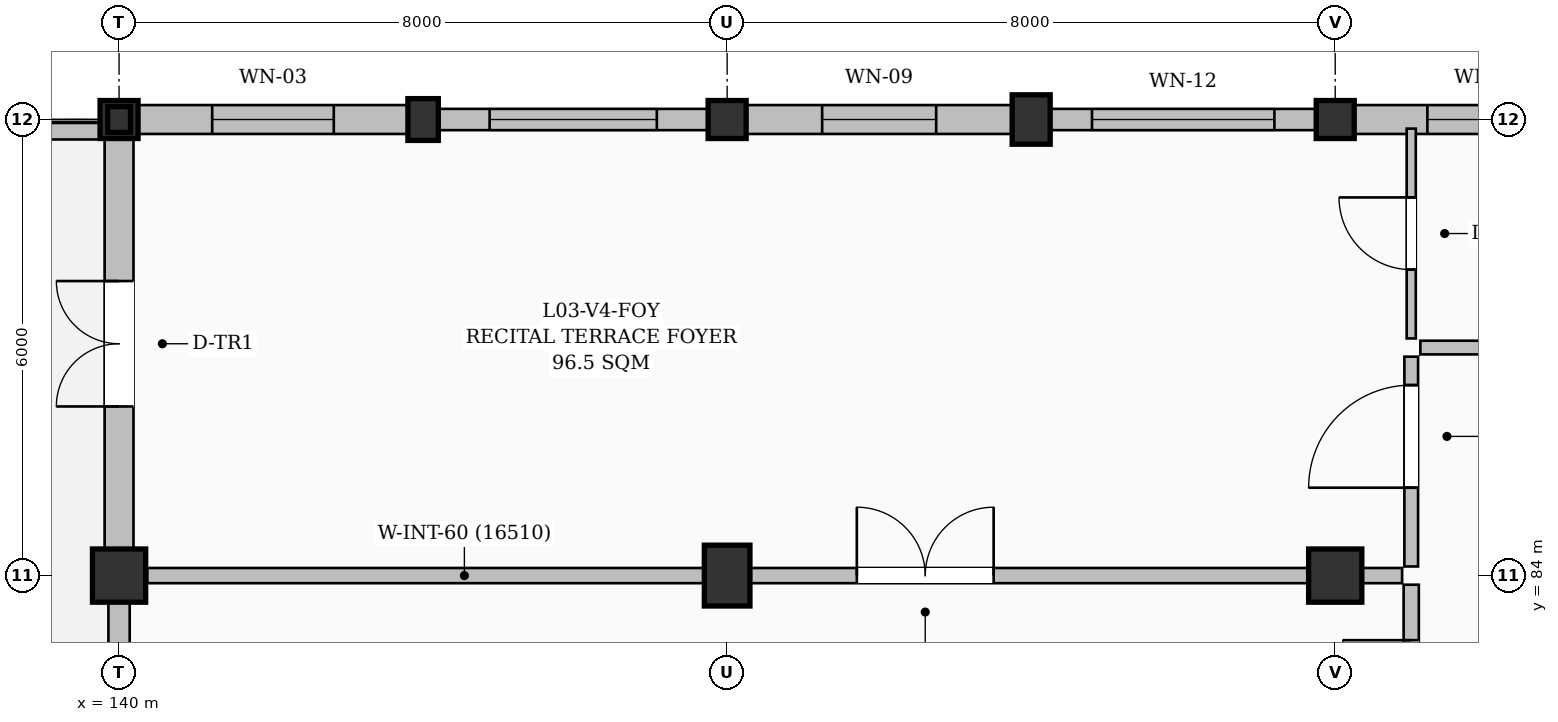
"""IFC4 building model, lengths in metres.
Left out: names, types, materials, properties, quantities, classifications, styles, units other than length and angle.
Written with IfcOpenShell. Run it as: python <this file> out.ifc"""

import sys

from ifc_helpers import new_model, si_unit, direction, frame, frame_2d, origin, origin_2d, place, context, subcontext, project, spatial, rectangle, i_section, extrude, element, fill, save


model = new_model("IFC4")
c1 = context("Model", 3, precision=1e-05, world=origin(), true_north=direction((0.0, 1.0)))
c2 = subcontext(c1, "Body", "Model", "MODEL_VIEW")
j1 = project(units=[si_unit("LENGTHUNIT", "METRE"), si_unit("PLANEANGLEUNIT", "RADIAN")], contexts=[c1])
p1 = place(None, origin())
s1 = spatial("IfcSite", under=j1, at=p1, CompositionType="ELEMENT")
p2 = place(p1, origin())
s2 = spatial("IfcBuilding", under=s1, at=p2, CompositionType="ELEMENT")
p3 = place(p2, frame((0.0, 0.0, 13.8)))
s3 = spatial("IfcBuildingStorey", under=s2, at=p3, CompositionType="ELEMENT", Elevation=13.8)
p4 = place(p3, frame((140.0, 84.0, 0.0), z_axis=(0.0, 0.0, 1.0), x_axis=(1.0, 0.0, 0.0)))
e1 = element("IfcColumn", 1, at=p4, inside=s3, PredefinedType="COLUMN", context=c2, shape_type="SweptSolid", body=[
    extrude(rectangle(XDim=0.7, YDim=0.7, at=origin_2d()), origin(), (0.0, 0.0, 1.0), 4.5),
])
p5 = place(p3, frame((140.0, 90.0, 0.0), z_axis=(0.0, 0.0, 1.0), x_axis=(1.0, 0.0, 0.0)))
e2 = element("IfcColumn", 2, at=p5, inside=s3, PredefinedType="COLUMN", context=c2, shape_type="SweptSolid", body=[
    extrude(rectangle(XDim=0.5, YDim=0.5, at=origin_2d()), origin(), (0.0, 0.0, 1.0), 4.5),
])
p6 = place(p3, frame((144.0, 90.0, 0.0), z_axis=(0.0, 0.0, 1.0), x_axis=(1.0, 0.0, 0.0)))
e3 = element("IfcColumn", 3, at=p6, inside=s3, PredefinedType="PILASTER", context=c2, shape_type="SweptSolid", body=[
    extrude(rectangle(XDim=0.4, YDim=0.55, at=origin_2d()), origin(), (0.0, 0.0, 1.0), 4.5),
])
p7 = place(p3, frame((148.0, 84.0, 0.0), z_axis=(0.0, 0.0, 1.0), x_axis=(1.0, 0.0, 0.0)))
e4 = element("IfcColumn", 4, at=p7, inside=s3, PredefinedType="COLUMN", context=c2, shape_type="SweptSolid", body=[
    extrude(rectangle(XDim=0.6, YDim=0.8, at=origin_2d()), origin(), (0.0, 0.0, 1.0), 4.5),
])
p8 = place(p3, frame((148.0, 90.0, 0.0), z_axis=(0.0, 0.0, 1.0), x_axis=(1.0, 0.0, 0.0)))
e5 = element("IfcColumn", 5, at=p8, inside=s3, PredefinedType="COLUMN", context=c2, shape_type="SweptSolid", body=[
    extrude(rectangle(XDim=0.5, YDim=0.5, at=origin_2d()), origin(), (0.0, 0.0, 1.0), 4.5),
])
p9 = place(p3, frame((152.0, 90.0, 0.0), z_axis=(0.0, 0.0, 1.0), x_axis=(1.0, 0.0, 0.0)))
e6 = element("IfcColumn", 6, at=p9, inside=s3, PredefinedType="PILASTER", context=c2, shape_type="SweptSolid", body=[
    extrude(rectangle(XDim=0.5, YDim=0.65, at=origin_2d()), origin(), (0.0, 0.0, 1.0), 4.5),
])
p10 = place(p3, frame((156.0, 84.0, 0.0), z_axis=(0.0, 0.0, 1.0), x_axis=(1.0, 0.0, 0.0)))
e7 = element("IfcColumn", 7, at=p10, inside=s3, PredefinedType="COLUMN", context=c2, shape_type="SweptSolid", body=[
    extrude(rectangle(XDim=0.7, YDim=0.7, at=origin_2d()), origin(), (0.0, 0.0, 1.0), 4.5),
])
p11 = place(p3, frame((156.0, 90.0, 0.0), z_axis=(0.0, 0.0, 1.0), x_axis=(1.0, 0.0, 0.0)))
e8 = element("IfcColumn", 8, at=p11, inside=s3, PredefinedType="COLUMN", context=c2, shape_type="SweptSolid", body=[
    extrude(rectangle(XDim=0.5, YDim=0.5, at=origin_2d()), origin(), (0.0, 0.0, 1.0), 4.5),
])
p12 = place(p3, frame((140.0, 90.0, 4.5), z_axis=(0.0, 0.0, 1.0), x_axis=(1.0, 0.0, 0.0)))
e9 = element("IfcColumn", 9, at=p12, inside=s3, PredefinedType="COLUMN", context=c2, shape_type="SweptSolid", body=[
    extrude(i_section(OverallWidth=0.3, OverallDepth=0.34, WebThickness=0.012, FlangeThickness=0.021, FilletRadius=0.027, at=origin_2d()), origin(), (0.0, 0.0, 1.0), 1.454),
])
p13 = place(p3, frame((140.0, 76.35, 0.0), z_axis=(0.0, 0.0, 1.0), x_axis=(0.0, 1.0, 0.0)))
e10 = element("IfcWall", 10, at=p13, inside=s3, PredefinedType="SOLIDWALL", context=c2, shape_type="SweptSolid", body=[
    extrude(rectangle(XDim=7.3, YDim=0.28, at=frame_2d((3.65, 0.0))), origin(), (0.0, 0.0, 1.0), 3.585),
])
p14 = place(p13, frame((2.55, 0.0, 0.95)))
e11 = element("IfcOpeningElement", 11, at=p14, cuts=e10, PredefinedType="OPENING", context=c2, shape_type="SweptSolid", body=[
    extrude(rectangle(XDim=2.2, YDim=1.8, at=frame_2d((1.1, 0.9))), frame((0.0, 0.15, 0.0), z_axis=(0.0, -1.0, 0.0), x_axis=(1.0, 0.0, 0.0)), (0.0, 0.0, 1.0), 0.3),
])
p15 = place(p3, frame((140.0, 84.35, 0.0), z_axis=(0.0, 0.0, 1.0), x_axis=(0.0, 1.0, 0.0)))
e12 = element("IfcWall", 12, at=p15, inside=s3, PredefinedType="SOLIDWALL", context=c2, shape_type="SweptSolid", body=[
    extrude(rectangle(XDim=5.4, YDim=0.38, at=frame_2d((2.7, 0.0))), origin(), (0.0, 0.0, 1.0), 3.585),
])
p16 = place(p15, frame((1.875, 0.0, 0.0)))
e13 = element("IfcOpeningElement", 13, at=p16, cuts=e12, PredefinedType="OPENING", context=c2, shape_type="SweptSolid", body=[
    extrude(rectangle(XDim=1.65, YDim=2.25, at=frame_2d((0.825, 1.125))), frame((0.0, 0.2, 0.0), z_axis=(0.0, -1.0, 0.0), x_axis=(1.0, 0.0, 0.0)), (0.0, 0.0, 1.0), 0.4),
])
p17 = place(p3, frame((140.25, 90.0, 0.0), z_axis=(0.0, 0.0, 1.0), x_axis=(1.0, 0.0, 0.0)))
e14 = element("IfcWall", 14, at=p17, inside=s3, PredefinedType="SOLIDWALL", context=c2, shape_type="SweptSolid", body=[
    extrude(rectangle(XDim=3.55, YDim=0.38, at=frame_2d((1.775, 0.0))), origin(), (0.0, 0.0, 1.0), 4.125),
])
p18 = place(p17, frame((0.975, 0.0, 0.95)))
e15 = element("IfcOpeningElement", 15, at=p18, cuts=e14, PredefinedType="OPENING", context=c2, shape_type="SweptSolid", body=[
    extrude(rectangle(XDim=1.6, YDim=1.8, at=frame_2d((0.8, 0.9))), frame((0.0, 0.2, 0.0), z_axis=(0.0, -1.0, 0.0), x_axis=(1.0, 0.0, 0.0)), (0.0, 0.0, 1.0), 0.4),
])
p19 = place(p3, frame((144.2, 90.0, 0.0), z_axis=(0.0, 0.0, 1.0), x_axis=(1.0, 0.0, 0.0)))
e16 = element("IfcWall", 16, at=p19, inside=s3, PredefinedType="SOLIDWALL", context=c2, shape_type="SweptSolid", body=[
    extrude(rectangle(XDim=3.55, YDim=0.28, at=frame_2d((1.775, 0.0))), origin(), (0.0, 0.0, 1.0), 4.125),
])
p20 = place(p19, frame((0.675, 0.0, 0.95)))
e17 = element("IfcOpeningElement", 17, at=p20, cuts=e16, PredefinedType="OPENING", context=c2, shape_type="SweptSolid", body=[
    extrude(rectangle(XDim=2.2, YDim=1.8, at=frame_2d((1.1, 0.9))), frame((0.0, 0.15, 0.0), z_axis=(0.0, -1.0, 0.0), x_axis=(1.0, 0.0, 0.0)), (0.0, 0.0, 1.0), 0.3),
])
p21 = place(p3, frame((148.25, 90.0, 0.0), z_axis=(0.0, 0.0, 1.0), x_axis=(1.0, 0.0, 0.0)))
e18 = element("IfcWall", 18, at=p21, inside=s3, PredefinedType="SOLIDWALL", context=c2, shape_type="SweptSolid", body=[
    extrude(rectangle(XDim=3.5, YDim=0.38, at=frame_2d((1.75, 0.0))), origin(), (0.0, 0.0, 1.0), 4.125),
])
p22 = place(p21, frame((1.0, 0.0, 0.95)))
e19 = element("IfcOpeningElement", 19, at=p22, cuts=e18, PredefinedType="OPENING", context=c2, shape_type="SweptSolid", body=[
    extrude(rectangle(XDim=1.5, YDim=1.5, at=frame_2d((0.75, 0.75))), frame((0.0, 0.2, 0.0), z_axis=(0.0, -1.0, 0.0), x_axis=(1.0, 0.0, 0.0)), (0.0, 0.0, 1.0), 0.4),
])
p23 = place(p3, frame((152.25, 90.0, 0.0), z_axis=(0.0, 0.0, 1.0), x_axis=(1.0, 0.0, 0.0)))
e20 = element("IfcWall", 20, at=p23, inside=s3, PredefinedType="SOLIDWALL", context=c2, shape_type="SweptSolid", body=[
    extrude(rectangle(XDim=3.5, YDim=0.28, at=frame_2d((1.75, 0.0))), origin(), (0.0, 0.0, 1.0), 4.125),
])
p24 = place(p23, frame((0.55, 0.0, 0.95)))
e21 = element("IfcOpeningElement", 21, at=p24, cuts=e20, PredefinedType="OPENING", context=c2, shape_type="SweptSolid", body=[
    extrude(rectangle(XDim=2.4, YDim=1.5, at=frame_2d((1.2, 0.75))), frame((0.0, 0.15, 0.0), z_axis=(0.0, -1.0, 0.0), x_axis=(1.0, 0.0, 0.0)), (0.0, 0.0, 1.0), 0.3),
])
p25 = place(p3, frame((156.25, 90.0, 0.0), z_axis=(0.0, 0.0, 1.0), x_axis=(1.0, 0.0, 0.0)))
e22 = element("IfcWall", 22, at=p25, inside=s3, PredefinedType="SOLIDWALL", context=c2, shape_type="SweptSolid", body=[
    extrude(rectangle(XDim=3.525, YDim=0.38, at=frame_2d((1.762, 0.0))), origin(), (0.0, 0.0, 1.0), 4.125),
])
p26 = place(p25, frame((0.962, 0.0, 0.95)))
e23 = element("IfcOpeningElement", 23, at=p26, cuts=e22, PredefinedType="OPENING", context=c2, shape_type="SweptSolid", body=[
    extrude(rectangle(XDim=1.6, YDim=1.2, at=frame_2d((0.8, 0.6))), frame((0.0, 0.2, 0.0), z_axis=(0.0, -1.0, 0.0), x_axis=(1.0, 0.0, 0.0)), (0.0, 0.0, 1.0), 0.4),
])
p27 = place(p3, frame((132.15, 89.85, 0.0), z_axis=(0.0, 0.0, 1.0), x_axis=(1.0, 0.0, 0.0)))
e24 = element("IfcWall", 24, at=p27, inside=s3, PredefinedType="PARAPET", context=c2, shape_type="SweptSolid", body=[
    extrude(rectangle(XDim=7.7, YDim=0.225, at=frame_2d((3.85, 0.0))), origin(), (0.0, 0.0, 1.0), 0.45),
])
p28 = place(p3, frame((140.37, 84.0, 0.0), z_axis=(0.0, 0.0, 1.0), x_axis=(1.0, 0.0, 0.0)))
e25 = element("IfcWall", 25, at=p28, inside=s3, PredefinedType="PARTITIONING", context=c2, shape_type="SweptSolid", body=[
    extrude(rectangle(XDim=16.51, YDim=0.2, at=frame_2d((8.255, 0.0))), origin(), (0.0, 0.0, 1.0), 4.25),
])
p29 = place(p28, frame((9.336, 0.0, 0.0)))
e26 = element("IfcOpeningElement", 26, at=p29, cuts=e25, PredefinedType="OPENING", context=c2, shape_type="SweptSolid", body=[
    extrude(rectangle(XDim=1.8, YDim=2.35, at=frame_2d((0.9, 1.175))), frame((0.0, 0.11, 0.0), z_axis=(0.0, -1.0, 0.0), x_axis=(1.0, 0.0, 0.0)), (0.0, 0.0, 1.0), 0.22),
])
p30 = place(p3, frame((157.0, 80.62, 0.0), z_axis=(0.0, 0.0, 1.0), x_axis=(0.0, 1.0, 0.0)))
e27 = element("IfcWall", 27, at=p30, inside=s3, PredefinedType="PARTITIONING", context=c2, shape_type="SweptSolid", body=[
    extrude(rectangle(XDim=3.26, YDim=0.2, at=frame_2d((1.63, 0.0))), origin(), (0.0, 0.0, 1.0), 4.25),
])
p31 = place(p30, frame((0.73, 0.0, 0.0)))
e28 = element("IfcOpeningElement", 28, at=p31, cuts=e27, PredefinedType="OPENING", context=c2, shape_type="SweptSolid", body=[
    extrude(rectangle(XDim=1.8, YDim=2.35, at=frame_2d((0.9, 1.175))), frame((0.0, 0.11, 0.0), z_axis=(0.0, -1.0, 0.0), x_axis=(1.0, 0.0, 0.0)), (0.0, 0.0, 1.0), 0.22),
])
p32 = place(p3, frame((157.0, 84.12, 0.0), z_axis=(0.0, 0.0, 1.0), x_axis=(0.0, 1.0, 0.0)))
e29 = element("IfcWall", 29, at=p32, inside=s3, PredefinedType="PARTITIONING", context=c2, shape_type="SweptSolid", body=[
    extrude(rectangle(XDim=2.76, YDim=0.18, at=frame_2d((1.38, 0.0))), origin(), (0.0, 0.0, 1.0), 4.25),
])
p33 = place(p32, frame((1.036, 0.0, 0.0)))
e30 = element("IfcOpeningElement", 30, at=p33, cuts=e29, PredefinedType="OPENING", context=c2, shape_type="SweptSolid", body=[
    extrude(rectangle(XDim=1.35, YDim=2.2, at=frame_2d((0.675, 1.1))), frame((0.0, 0.1, 0.0), z_axis=(0.0, -1.0, 0.0), x_axis=(1.0, 0.0, 0.0)), (0.0, 0.0, 1.0), 0.2),
])
p34 = place(p3, frame((157.0, 87.12, 0.0), z_axis=(0.0, 0.0, 1.0), x_axis=(0.0, 1.0, 0.0)))
e31 = element("IfcWall", 31, at=p34, inside=s3, PredefinedType="PARTITIONING", context=c2, shape_type="SweptSolid", body=[
    extrude(rectangle(XDim=2.76, YDim=0.12, at=frame_2d((1.38, 0.0))), origin(), (0.0, 0.0, 1.0), 4.25),
])
p35 = place(p34, frame((0.905, 0.0, 0.0)))
e32 = element("IfcOpeningElement", 32, at=p35, cuts=e31, PredefinedType="OPENING", context=c2, shape_type="SweptSolid", body=[
    extrude(rectangle(XDim=0.95, YDim=2.1, at=frame_2d((0.475, 1.05))), frame((0.0, 0.07, 0.0), z_axis=(0.0, -1.0, 0.0), x_axis=(1.0, 0.0, 0.0)), (0.0, 0.0, 1.0), 0.14),
])
p36 = place(p3, frame((157.12, 87.0, 0.0), z_axis=(0.0, 0.0, 1.0), x_axis=(1.0, 0.0, 0.0)))
e33 = element("IfcWall", 33, at=p36, inside=s3, PredefinedType="PARTITIONING", context=c2, shape_type="SweptSolid", body=[
    extrude(rectangle(XDim=11.76, YDim=0.18, at=frame_2d((5.88, 0.0))), origin(), (0.0, 0.0, 1.0), 4.25),
])
p37 = place(p16, origin())
e34 = element("IfcDoor", 34, at=p37, inside=s3, OperationType="DOUBLE_DOOR_SINGLE_SWING", PredefinedType="DOOR", context=c2, shape_type="SweptSolid", body=[
    extrude(rectangle(XDim=1.65, YDim=2.25, at=frame_2d((0.825, 1.125))), frame((0.0, 0.025, 0.0), z_axis=(0.0, -1.0, 0.0), x_axis=(1.0, 0.0, 0.0)), (0.0, 0.0, 1.0), 0.05),
])
fill(e13, e34)
p38 = place(p18, origin())
e35 = element("IfcWindow", 35, at=p38, inside=s3, PartitioningType="DOUBLE_PANEL_VERTICAL", PredefinedType="WINDOW", context=c2, shape_type="SweptSolid", body=[
    extrude(rectangle(XDim=1.6, YDim=1.8, at=frame_2d((0.8, 0.9))), frame((0.0, 0.03, 0.0), z_axis=(0.0, -1.0, 0.0), x_axis=(1.0, 0.0, 0.0)), (0.0, 0.0, 1.0), 0.06),
])
fill(e15, e35)
p39 = place(p20, origin())
e36 = element("IfcWindow", 36, at=p39, inside=s3, PartitioningType="TRIPLE_PANEL_VERTICAL", PredefinedType="WINDOW", context=c2, shape_type="SweptSolid", body=[
    extrude(rectangle(XDim=2.2, YDim=1.8, at=frame_2d((1.1, 0.9))), frame((0.0, 0.03, 0.0), z_axis=(0.0, -1.0, 0.0), x_axis=(1.0, 0.0, 0.0)), (0.0, 0.0, 1.0), 0.06),
])
fill(e17, e36)
p40 = place(p22, origin())
e37 = element("IfcWindow", 37, at=p40, inside=s3, PartitioningType="DOUBLE_PANEL_VERTICAL", PredefinedType="WINDOW", context=c2, shape_type="SweptSolid", body=[
    extrude(rectangle(XDim=1.5, YDim=1.5, at=frame_2d((0.75, 0.75))), frame((0.0, 0.03, 0.0), z_axis=(0.0, -1.0, 0.0), x_axis=(1.0, 0.0, 0.0)), (0.0, 0.0, 1.0), 0.06),
])
fill(e19, e37)
p41 = place(p24, origin())
e38 = element("IfcWindow", 38, at=p41, inside=s3, PartitioningType="TRIPLE_PANEL_VERTICAL", PredefinedType="WINDOW", context=c2, shape_type="SweptSolid", body=[
    extrude(rectangle(XDim=2.4, YDim=1.5, at=frame_2d((1.2, 0.75))), frame((0.0, 0.03, 0.0), z_axis=(0.0, -1.0, 0.0), x_axis=(1.0, 0.0, 0.0)), (0.0, 0.0, 1.0), 0.06),
])
fill(e21, e38)
p42 = place(p26, origin())
e39 = element("IfcWindow", 39, at=p42, inside=s3, PartitioningType="DOUBLE_PANEL_HORIZONTAL", PredefinedType="WINDOW", context=c2, shape_type="SweptSolid", body=[
    extrude(rectangle(XDim=1.6, YDim=1.2, at=frame_2d((0.8, 0.6))), frame((0.0, 0.03, 0.0), z_axis=(0.0, -1.0, 0.0), x_axis=(1.0, 0.0, 0.0)), (0.0, 0.0, 1.0), 0.06),
])
fill(e23, e39)
p43 = place(p29, origin())
e40 = element("IfcDoor", 40, at=p43, inside=s3, OperationType="DOUBLE_DOOR_SINGLE_SWING", PredefinedType="DOOR", context=c2, shape_type="SweptSolid", body=[
    extrude(rectangle(XDim=1.8, YDim=2.35, at=frame_2d((0.9, 1.175))), frame((0.0, 0.025, 0.0), z_axis=(0.0, -1.0, 0.0), x_axis=(1.0, 0.0, 0.0)), (0.0, 0.0, 1.0), 0.05),
])
fill(e26, e40)
p44 = place(p31, origin())
e41 = element("IfcDoor", 41, at=p44, inside=s3, OperationType="DOUBLE_DOOR_SINGLE_SWING", PredefinedType="DOOR", context=c2, shape_type="SweptSolid", body=[
    extrude(rectangle(XDim=1.8, YDim=2.35, at=frame_2d((0.9, 1.175))), frame((0.0, 0.025, 0.0), z_axis=(0.0, -1.0, 0.0), x_axis=(1.0, 0.0, 0.0)), (0.0, 0.0, 1.0), 0.05),
])
fill(e28, e41)
p45 = place(p33, origin())
e42 = element("IfcDoor", 42, at=p45, inside=s3, OperationType="SINGLE_SWING_LEFT", PredefinedType="DOOR", context=c2, shape_type="SweptSolid", body=[
    extrude(rectangle(XDim=1.35, YDim=2.2, at=frame_2d((0.675, 1.1))), frame((0.0, 0.025, 0.0), z_axis=(0.0, -1.0, 0.0), x_axis=(1.0, 0.0, 0.0)), (0.0, 0.0, 1.0), 0.05),
])
fill(e30, e42)
p46 = place(p35, origin())
e43 = element("IfcDoor", 43, at=p46, inside=s3, OperationType="SINGLE_SWING_RIGHT", PredefinedType="DOOR", context=c2, shape_type="SweptSolid", body=[
    extrude(rectangle(XDim=0.95, YDim=2.1, at=frame_2d((0.475, 1.05))), frame((0.0, 0.025, 0.0), z_axis=(0.0, -1.0, 0.0), x_axis=(1.0, 0.0, 0.0)), (0.0, 0.0, 1.0), 0.05),
])
fill(e32, e43)
save(model, sys.argv[1])
